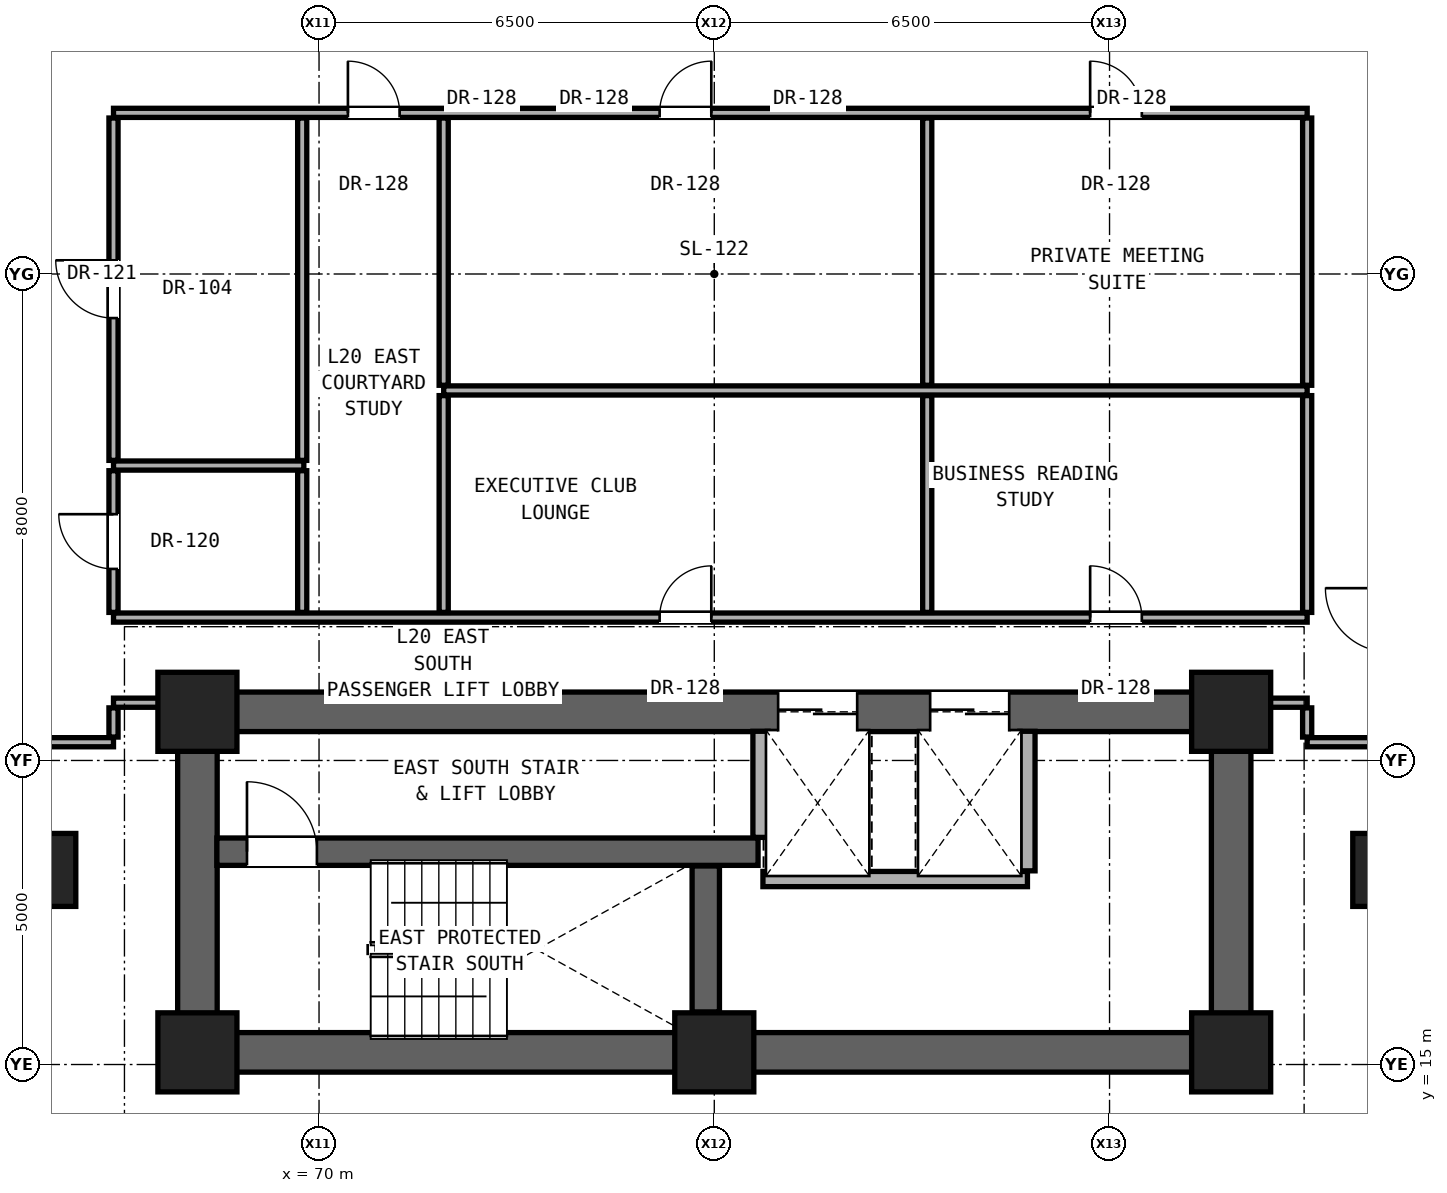
"""IFC4 building model, lengths in metres.
Left out: names, types, materials, properties, quantities, classifications, styles, units other than length and angle.
Written with IfcOpenShell. Run it as: python <this file> out.ifc"""

import sys

from ifc_helpers import new_model, si_unit, direction, frame, frame_2d, origin, origin_2d, place, context, subcontext, project, spatial, rectangle, extrude, element, fill, save


model = new_model("IFC4")
c1 = context("Model", 3, precision=1e-05, world=origin(), true_north=direction((0.0, 1.0)))
c2 = subcontext(c1, "Body", "Model", "MODEL_VIEW")
j1 = project(units=[si_unit("LENGTHUNIT", "METRE"), si_unit("PLANEANGLEUNIT", "RADIAN")], contexts=[c1])
p1 = place(None, origin())
s1 = spatial("IfcSite", under=j1, at=p1, CompositionType="ELEMENT")
p2 = place(p1, origin())
s2 = spatial("IfcBuilding", under=s1, at=p2, CompositionType="ELEMENT")
p3 = place(p2, frame((0.0, 0.0, 71.9)))
s3 = spatial("IfcBuildingStorey", under=s2, at=p3, CompositionType="ELEMENT", Elevation=71.9)
for number, where, z_axis, x_axis in (
    (1, (68.0, 15.2, 0.0), (0.0, 0.0, 1.0), (1.0, 0.0, 0.0)),
    (2, (76.5, 15.2, 0.0), (0.0, 0.0, 1.0), (1.0, 0.0, 0.0)),
    (3, (85.0, 15.2, 0.0), (0.0, 0.0, 1.0), (1.0, 0.0, 0.0)),
    (4, (68.0, 20.8, 0.0), (0.0, 0.0, 1.0), (1.0, 0.0, 0.0)),
    (5, (85.0, 20.8, 0.0), (0.0, 0.0, 1.0), (1.0, 0.0, 0.0)),
):
    element("IfcColumn", number, at=place(p3, frame(where, z_axis=z_axis, x_axis=x_axis)), inside=s3, PredefinedType="COLUMN", context=c2, shape_type="SweptSolid", body=[
        extrude(rectangle(XDim=1.3, YDim=1.3, at=origin_2d()), origin(), (0.0, 0.0, 1.0), 3.3),
    ])
for number, where, z_axis, x_axis in (
    (6, (65.6, 18.2, 0.0), (0.0, 0.0, 1.0), (1.0, 0.0, 0.0)),
    (7, (87.4, 18.2, 0.0), (0.0, 0.0, 1.0), (1.0, 0.0, 0.0)),
):
    element("IfcColumn", number, at=place(p3, frame(where, z_axis=z_axis, x_axis=x_axis)), inside=s3, PredefinedType="PILASTER", context=c2, shape_type="SweptSolid", body=[
        extrude(rectangle(XDim=0.8, YDim=1.2, at=origin_2d()), origin(), (0.0, 0.0, 1.0), 3.3),
    ])
p4 = place(p3, frame((68.0, 15.2, 0.0), z_axis=(0.0, 0.0, 1.0), x_axis=(1.0, 0.0, 0.0)))
e8 = element("IfcWall", 8, at=p4, inside=s3, PredefinedType="SHEAR", context=c2, shape_type="SweptSolid", body=[
    extrude(rectangle(XDim=17.0, YDim=0.65, at=frame_2d((8.5, 0.0))), origin(), (0.0, 0.0, 1.0), 3.06),
])
for number, where, z_axis, x_axis in (
    (9, (68.0, 15.2, 0.0), (0.0, 0.0, 1.0), (0.0, 1.0, 0.0)),
    (10, (85.0, 15.2, 0.0), (0.0, 0.0, 1.0), (0.0, 1.0, 0.0)),
):
    element("IfcWall", number, at=place(p3, frame(where, z_axis=z_axis, x_axis=x_axis)), inside=s3, PredefinedType="SHEAR", context=c2, shape_type="SweptSolid", body=[
        extrude(rectangle(XDim=5.6, YDim=0.65, at=frame_2d((2.8, 0.0))), origin(), (0.0, 0.0, 1.0), 3.06),
    ])
p5 = place(p3, frame((68.0, 20.8, 0.0), z_axis=(0.0, 0.0, 1.0), x_axis=(1.0, 0.0, 0.0)))
e11 = element("IfcWall", 11, at=p5, inside=s3, PredefinedType="SHEAR", context=c2, shape_type="SweptSolid", body=[
    extrude(rectangle(XDim=17.0, YDim=0.65, at=frame_2d((8.5, 0.0))), origin(), (0.0, 0.0, 1.0), 3.06),
])
p6 = place(p5, frame((9.55, 0.0, 0.0)))
e12 = element("IfcOpeningElement", 12, at=p6, cuts=e11, PredefinedType="OPENING", context=c2, shape_type="SweptSolid", body=[
    extrude(rectangle(XDim=1.3, YDim=2.3, at=frame_2d((0.65, 1.15))), frame((0.0, 0.335, 0.0), z_axis=(0.0, -1.0, 0.0), x_axis=(1.0, 0.0, 0.0)), (0.0, 0.0, 1.0), 0.67),
])
p7 = place(p5, frame((12.05, 0.0, 0.0)))
e13 = element("IfcOpeningElement", 13, at=p7, cuts=e11, PredefinedType="OPENING", context=c2, shape_type="SweptSolid", body=[
    extrude(rectangle(XDim=1.3, YDim=2.3, at=frame_2d((0.65, 1.15))), frame((0.0, 0.335, 0.0), z_axis=(0.0, -1.0, 0.0), x_axis=(1.0, 0.0, 0.0)), (0.0, 0.0, 1.0), 0.67),
])
p8 = place(p3, frame((77.3, 18.05, 0.0), z_axis=(0.0, 0.0, 1.0), x_axis=(1.0, 0.0, 0.0)))
e14 = element("IfcWall", 14, at=p8, inside=s3, PredefinedType="SOLIDWALL", context=c2, shape_type="SweptSolid", body=[
    extrude(rectangle(XDim=4.35, YDim=0.25, at=frame_2d((2.175, 0.0))), origin(), (0.0, 0.0, 1.0), 3.06),
])
p9 = place(p3, frame((68.32, 18.5, 0.0), z_axis=(0.0, 0.0, 1.0), x_axis=(1.0, 0.0, 0.0)))
e15 = element("IfcWall", 15, at=p9, inside=s3, PredefinedType="SHEAR", context=c2, shape_type="SweptSolid", body=[
    extrude(rectangle(XDim=8.9, YDim=0.45, at=frame_2d((4.45, 0.0))), origin(), (0.0, 0.0, 1.0), 3.06),
])
p10 = place(p9, frame((0.495, 0.0, 0.0)))
e16 = element("IfcOpeningElement", 16, at=p10, cuts=e15, PredefinedType="OPENING", context=c2, shape_type="SweptSolid", body=[
    extrude(rectangle(XDim=1.15, YDim=2.2, at=frame_2d((0.575, 1.1))), frame((0.0, 0.235, 0.0), z_axis=(0.0, -1.0, 0.0), x_axis=(1.0, 0.0, 0.0)), (0.0, 0.0, 1.0), 0.47),
])
p11 = place(p3, frame((65.25, 20.3, 0.0), z_axis=(0.0, 0.0, 1.0), x_axis=(1.0, 0.0, 0.0)))
e17 = element("IfcWall", 17, at=p11, inside=s3, PredefinedType="PARTITIONING", context=c2, shape_type="SweptSolid", body=[
    extrude(rectangle(XDim=1.37, YDim=0.15, at=frame_2d((0.685, 0.0))), origin(), (0.0, 0.0, 1.0), 3.06),
])
p12 = place(p3, frame((86.25, 20.3, 0.0), z_axis=(0.0, 0.0, 1.0), x_axis=(1.0, 0.0, 0.0)))
e18 = element("IfcWall", 18, at=p12, inside=s3, PredefinedType="PARTITIONING", context=c2, shape_type="SweptSolid", body=[
    extrude(rectangle(XDim=1.35, YDim=0.15, at=frame_2d((0.675, 0.0))), origin(), (0.0, 0.0, 1.0), 3.06),
])
p13 = place(p3, frame((66.62, 20.95, 0.0), z_axis=(0.0, 0.0, 1.0), x_axis=(1.0, 0.0, 0.0)))
e19 = element("IfcWall", 19, at=p13, inside=s3, PredefinedType="PARTITIONING", context=c2, shape_type="SweptSolid", body=[
    extrude(rectangle(XDim=1.06, YDim=0.15, at=frame_2d((0.53, 0.0))), origin(), (0.0, 0.0, 1.0), 2.452),
])
p14 = place(p3, frame((85.32, 20.95, 0.0), z_axis=(0.0, 0.0, 1.0), x_axis=(1.0, 0.0, 0.0)))
e20 = element("IfcWall", 20, at=p14, inside=s3, PredefinedType="PARTITIONING", context=c2, shape_type="SweptSolid", body=[
    extrude(rectangle(XDim=0.93, YDim=0.15, at=frame_2d((0.465, 0.0))), origin(), (0.0, 0.0, 1.0), 2.452),
])
p15 = place(p3, frame((66.62, 22.35, 0.0), z_axis=(0.0, 0.0, 1.0), x_axis=(1.0, 0.0, 0.0)))
e21 = element("IfcWall", 21, at=p15, inside=s3, PredefinedType="PARTITIONING", context=c2, shape_type="SweptSolid", body=[
    extrude(rectangle(XDim=19.63, YDim=0.15, at=frame_2d((9.815, 0.0))), origin(), (0.0, 0.0, 1.0), 2.125),
])
p16 = place(p15, frame((8.981, 0.0, 0.0)))
e22 = element("IfcOpeningElement", 22, at=p16, cuts=e21, PredefinedType="OPENING", context=c2, shape_type="SweptSolid", body=[
    extrude(rectangle(XDim=0.85, YDim=2.01, at=frame_2d((0.425, 1.005))), frame((0.0, 0.085, 0.0), z_axis=(0.0, -1.0, 0.0), x_axis=(1.0, 0.0, 0.0)), (0.0, 0.0, 1.0), 0.17),
])
p17 = place(p15, frame((16.061, 0.0, 0.0)))
e23 = element("IfcOpeningElement", 23, at=p17, cuts=e21, PredefinedType="OPENING", context=c2, shape_type="SweptSolid", body=[
    extrude(rectangle(XDim=0.85, YDim=2.01, at=frame_2d((0.425, 1.005))), frame((0.0, 0.085, 0.0), z_axis=(0.0, -1.0, 0.0), x_axis=(1.0, 0.0, 0.0)), (0.0, 0.0, 1.0), 0.17),
])
p18 = place(p3, frame((66.62, 24.85, 0.0), z_axis=(0.0, 0.0, 1.0), x_axis=(1.0, 0.0, 0.0)))
e24 = element("IfcWall", 24, at=p18, inside=s3, PredefinedType="PARTITIONING", context=c2, shape_type="SweptSolid", body=[
    extrude(rectangle(XDim=3.13, YDim=0.15, at=frame_2d((1.565, 0.0))), origin(), (0.0, 0.0, 1.0), 2.125),
])
p19 = place(p3, frame((72.05, 26.085, 0.0), z_axis=(0.0, 0.0, 1.0), x_axis=(1.0, 0.0, 0.0)))
e25 = element("IfcWall", 25, at=p19, inside=s3, PredefinedType="PARTITIONING", context=c2, shape_type="SweptSolid", body=[
    extrude(rectangle(XDim=14.2, YDim=0.15, at=frame_2d((7.1, 0.0))), origin(), (0.0, 0.0, 1.0), 2.125),
])
p20 = place(p3, frame((66.62, 30.65, 0.0), z_axis=(0.0, 0.0, 1.0), x_axis=(1.0, 0.0, 0.0)))
e26 = element("IfcWall", 26, at=p20, inside=s3, PredefinedType="PARTITIONING", context=c2, shape_type="SweptSolid", body=[
    extrude(rectangle(XDim=19.63, YDim=0.15, at=frame_2d((9.815, 0.0))), origin(), (0.0, 0.0, 1.0), 2.125),
])
p21 = place(p20, frame((3.855, 0.0, 0.0)))
e27 = element("IfcOpeningElement", 27, at=p21, cuts=e26, PredefinedType="OPENING", context=c2, shape_type="SweptSolid", body=[
    extrude(rectangle(XDim=0.85, YDim=2.01, at=frame_2d((0.425, 1.005))), frame((0.0, 0.085, 0.0), z_axis=(0.0, -1.0, 0.0), x_axis=(1.0, 0.0, 0.0)), (0.0, 0.0, 1.0), 0.17),
])
p22 = place(p20, frame((8.981, 0.0, 0.0)))
e28 = element("IfcOpeningElement", 28, at=p22, cuts=e26, PredefinedType="OPENING", context=c2, shape_type="SweptSolid", body=[
    extrude(rectangle(XDim=0.85, YDim=2.01, at=frame_2d((0.425, 1.005))), frame((0.0, 0.085, 0.0), z_axis=(0.0, -1.0, 0.0), x_axis=(1.0, 0.0, 0.0)), (0.0, 0.0, 1.0), 0.17),
])
p23 = place(p20, frame((16.061, 0.0, 0.0)))
e29 = element("IfcOpeningElement", 29, at=p23, cuts=e26, PredefinedType="OPENING", context=c2, shape_type="SweptSolid", body=[
    extrude(rectangle(XDim=0.85, YDim=2.01, at=frame_2d((0.425, 1.005))), frame((0.0, 0.085, 0.0), z_axis=(0.0, -1.0, 0.0), x_axis=(1.0, 0.0, 0.0)), (0.0, 0.0, 1.0), 0.17),
])
p24 = place(p3, frame((66.62, 20.385, 0.0), z_axis=(0.0, 0.0, 1.0), x_axis=(0.0, 1.0, 0.0)))
e30 = element("IfcWall", 30, at=p24, inside=s3, PredefinedType="PARTITIONING", context=c2, shape_type="SweptSolid", body=[
    extrude(rectangle(XDim=0.48, YDim=0.15, at=frame_2d((0.24, 0.0))), origin(), (0.0, 0.0, 1.0), 2.452),
])
p25 = place(p3, frame((66.62, 22.435, 0.0), z_axis=(0.0, 0.0, 1.0), x_axis=(0.0, 1.0, 0.0)))
e31 = element("IfcWall", 31, at=p25, inside=s3, PredefinedType="PARTITIONING", context=c2, shape_type="SweptSolid", body=[
    extrude(rectangle(XDim=2.33, YDim=0.15, at=frame_2d((1.165, 0.0))), origin(), (0.0, 0.0, 1.0), 3.06),
])
p26 = place(p25, frame((0.715, 0.0, 0.0)))
e32 = element("IfcOpeningElement", 32, at=p26, cuts=e31, PredefinedType="OPENING", context=c2, shape_type="SweptSolid", body=[
    extrude(rectangle(XDim=0.9, YDim=2.1, at=frame_2d((0.45, 1.05))), frame((0.0, 0.085, 0.0), z_axis=(0.0, -1.0, 0.0), x_axis=(1.0, 0.0, 0.0)), (0.0, 0.0, 1.0), 0.17),
])
p27 = place(p3, frame((66.62, 24.935, 0.0), z_axis=(0.0, 0.0, 1.0), x_axis=(0.0, 1.0, 0.0)))
e33 = element("IfcWall", 33, at=p27, inside=s3, PredefinedType="PARTITIONING", context=c2, shape_type="SweptSolid", body=[
    extrude(rectangle(XDim=5.63, YDim=0.15, at=frame_2d((2.815, 0.0))), origin(), (0.0, 0.0, 1.0), 2.279),
])
p28 = place(p27, frame((2.34, 0.0, 0.0)))
e34 = element("IfcOpeningElement", 34, at=p28, cuts=e33, PredefinedType="OPENING", context=c2, shape_type="SweptSolid", body=[
    extrude(rectangle(XDim=0.95, YDim=2.15, at=frame_2d((0.475, 1.075))), frame((0.0, 0.085, 0.0), z_axis=(0.0, -1.0, 0.0), x_axis=(1.0, 0.0, 0.0)), (0.0, 0.0, 1.0), 0.17),
])
p29 = place(p3, frame((69.723, 22.435, 0.0), z_axis=(0.0, 0.0, 1.0), x_axis=(0.0, 1.0, 0.0)))
e35 = element("IfcWall", 35, at=p29, inside=s3, PredefinedType="PARTITIONING", context=c2, shape_type="SweptSolid", body=[
    extrude(rectangle(XDim=2.33, YDim=0.15, at=frame_2d((1.165, 0.0))), origin(), (0.0, 0.0, 1.0), 3.06),
])
p30 = place(p3, frame((69.723, 24.935, 0.0), z_axis=(0.0, 0.0, 1.0), x_axis=(0.0, 1.0, 0.0)))
e36 = element("IfcWall", 36, at=p30, inside=s3, PredefinedType="PARTITIONING", context=c2, shape_type="SweptSolid", body=[
    extrude(rectangle(XDim=5.63, YDim=0.15, at=frame_2d((2.815, 0.0))), origin(), (0.0, 0.0, 1.0), 2.125),
])
p31 = place(p3, frame((72.05, 22.435, 0.0), z_axis=(0.0, 0.0, 1.0), x_axis=(0.0, 1.0, 0.0)))
e37 = element("IfcWall", 37, at=p31, inside=s3, PredefinedType="PARTITIONING", context=c2, shape_type="SweptSolid", body=[
    extrude(rectangle(XDim=3.565, YDim=0.15, at=frame_2d((1.782, 0.0))), origin(), (0.0, 0.0, 1.0), 2.589),
])
p32 = place(p3, frame((72.05, 26.17, 0.0), z_axis=(0.0, 0.0, 1.0), x_axis=(0.0, 1.0, 0.0)))
e38 = element("IfcWall", 38, at=p32, inside=s3, PredefinedType="PARTITIONING", context=c2, shape_type="SweptSolid", body=[
    extrude(rectangle(XDim=4.395, YDim=0.15, at=frame_2d((2.198, 0.0))), origin(), (0.0, 0.0, 1.0), 2.125),
])
p33 = place(p3, frame((76.36, 15.865, 0.0), z_axis=(0.0, 0.0, 1.0), x_axis=(0.0, 1.0, 0.0)))
e39 = element("IfcWall", 39, at=p33, inside=s3, PredefinedType="SHEAR", context=c2, shape_type="SweptSolid", body=[
    extrude(rectangle(XDim=2.4, YDim=0.45, at=frame_2d((1.2, 0.0))), origin(), (0.0, 0.0, 1.0), 3.06),
])
p34 = place(p3, frame((77.26, 18.735, 0.0), z_axis=(0.0, 0.0, 1.0), x_axis=(0.0, 1.0, 0.0)))
e40 = element("IfcWall", 40, at=p34, inside=s3, PredefinedType="SOLIDWALL", context=c2, shape_type="SweptSolid", body=[
    extrude(rectangle(XDim=1.745, YDim=0.25, at=frame_2d((0.873, 0.0))), origin(), (0.0, 0.0, 1.0), 3.06),
])
p35 = place(p3, frame((80.002, 22.435, 0.0), z_axis=(0.0, 0.0, 1.0), x_axis=(0.0, 1.0, 0.0)))
e41 = element("IfcWall", 41, at=p35, inside=s3, PredefinedType="PARTITIONING", context=c2, shape_type="SweptSolid", body=[
    extrude(rectangle(XDim=3.565, YDim=0.15, at=frame_2d((1.782, 0.0))), origin(), (0.0, 0.0, 1.0), 3.06),
])
p36 = place(p3, frame((80.002, 26.17, 0.0), z_axis=(0.0, 0.0, 1.0), x_axis=(0.0, 1.0, 0.0)))
e42 = element("IfcWall", 42, at=p36, inside=s3, PredefinedType="PARTITIONING", context=c2, shape_type="SweptSolid", body=[
    extrude(rectangle(XDim=4.395, YDim=0.15, at=frame_2d((2.198, 0.0))), origin(), (0.0, 0.0, 1.0), 2.125),
])
p37 = place(p3, frame((81.65, 18.185, 0.0), z_axis=(0.0, 0.0, 1.0), x_axis=(0.0, 1.0, 0.0)))
e43 = element("IfcWall", 43, at=p37, inside=s3, PredefinedType="SOLIDWALL", context=c2, shape_type="SweptSolid", body=[
    extrude(rectangle(XDim=2.295, YDim=0.25, at=frame_2d((1.147, 0.0))), origin(), (0.0, 0.0, 1.0), 3.06),
])
p38 = place(p3, frame((86.25, 20.385, 0.0), z_axis=(0.0, 0.0, 1.0), x_axis=(0.0, 1.0, 0.0)))
e44 = element("IfcWall", 44, at=p38, inside=s3, PredefinedType="PARTITIONING", context=c2, shape_type="SweptSolid", body=[
    extrude(rectangle(XDim=0.48, YDim=0.15, at=frame_2d((0.24, 0.0))), origin(), (0.0, 0.0, 1.0), 2.452),
])
p39 = place(p3, frame((86.25, 22.435, 0.0), z_axis=(0.0, 0.0, 1.0), x_axis=(0.0, 1.0, 0.0)))
e45 = element("IfcWall", 45, at=p39, inside=s3, PredefinedType="PARTITIONING", context=c2, shape_type="SweptSolid", body=[
    extrude(rectangle(XDim=3.565, YDim=0.15, at=frame_2d((1.782, 0.0))), origin(), (0.0, 0.0, 1.0), 3.06),
])
p40 = place(p3, frame((86.25, 26.17, 0.0), z_axis=(0.0, 0.0, 1.0), x_axis=(0.0, 1.0, 0.0)))
e46 = element("IfcWall", 46, at=p40, inside=s3, PredefinedType="PARTITIONING", context=c2, shape_type="SweptSolid", body=[
    extrude(rectangle(XDim=4.395, YDim=0.15, at=frame_2d((2.198, 0.0))), origin(), (0.0, 0.0, 1.0), 2.279),
])
p41 = place(p10, origin())
e47 = element("IfcDoor", 47, at=p41, inside=s3, OperationType="SINGLE_SWING_LEFT", PredefinedType="DOOR", context=c2, shape_type="SweptSolid", body=[
    extrude(rectangle(XDim=1.15, YDim=2.2, at=frame_2d((0.575, 1.1))), frame((0.0, 0.025, 0.0), z_axis=(0.0, -1.0, 0.0), x_axis=(1.0, 0.0, 0.0)), (0.0, 0.0, 1.0), 0.05),
])
fill(e16, e47)
p42 = place(p26, origin())
e48 = element("IfcDoor", 48, at=p42, inside=s3, OperationType="SINGLE_SWING_RIGHT", PredefinedType="DOOR", context=c2, shape_type="SweptSolid", body=[
    extrude(rectangle(XDim=0.9, YDim=2.1, at=frame_2d((0.45, 1.05))), frame((0.0, 0.025, 0.0), z_axis=(0.0, -1.0, 0.0), x_axis=(1.0, 0.0, 0.0)), (0.0, 0.0, 1.0), 0.05),
])
fill(e32, e48)
p43 = place(p28, origin())
e49 = element("IfcDoor", 49, at=p43, inside=s3, OperationType="SINGLE_SWING_RIGHT", PredefinedType="DOOR", context=c2, shape_type="SweptSolid", body=[
    extrude(rectangle(XDim=0.95, YDim=2.15, at=frame_2d((0.475, 1.075))), frame((0.0, 0.025, 0.0), z_axis=(0.0, -1.0, 0.0), x_axis=(1.0, 0.0, 0.0)), (0.0, 0.0, 1.0), 0.05),
])
fill(e34, e49)
p44 = place(p21, origin())
e50 = element("IfcDoor", 50, at=p44, inside=s3, OperationType="SINGLE_SWING_LEFT", PredefinedType="DOOR", context=c2, shape_type="SweptSolid", body=[
    extrude(rectangle(XDim=0.85, YDim=2.01, at=frame_2d((0.425, 1.005))), frame((0.0, 0.025, 0.0), z_axis=(0.0, -1.0, 0.0), x_axis=(1.0, 0.0, 0.0)), (0.0, 0.0, 1.0), 0.05),
])
fill(e27, e50)
p45 = place(p16, origin())
e51 = element("IfcDoor", 51, at=p45, inside=s3, OperationType="SINGLE_SWING_RIGHT", PredefinedType="DOOR", context=c2, shape_type="SweptSolid", body=[
    extrude(rectangle(XDim=0.85, YDim=2.01, at=frame_2d((0.425, 1.005))), frame((0.0, 0.025, 0.0), z_axis=(0.0, -1.0, 0.0), x_axis=(1.0, 0.0, 0.0)), (0.0, 0.0, 1.0), 0.05),
])
fill(e22, e51)
p46 = place(p17, origin())
e52 = element("IfcDoor", 52, at=p46, inside=s3, OperationType="SINGLE_SWING_LEFT", PredefinedType="DOOR", context=c2, shape_type="SweptSolid", body=[
    extrude(rectangle(XDim=0.85, YDim=2.01, at=frame_2d((0.425, 1.005))), frame((0.0, 0.025, 0.0), z_axis=(0.0, -1.0, 0.0), x_axis=(1.0, 0.0, 0.0)), (0.0, 0.0, 1.0), 0.05),
])
fill(e23, e52)
p47 = place(p22, origin())
e53 = element("IfcDoor", 53, at=p47, inside=s3, OperationType="SINGLE_SWING_RIGHT", PredefinedType="DOOR", context=c2, shape_type="SweptSolid", body=[
    extrude(rectangle(XDim=0.85, YDim=2.01, at=frame_2d((0.425, 1.005))), frame((0.0, 0.025, 0.0), z_axis=(0.0, -1.0, 0.0), x_axis=(1.0, 0.0, 0.0)), (0.0, 0.0, 1.0), 0.05),
])
fill(e28, e53)
p48 = place(p23, origin())
e54 = element("IfcDoor", 54, at=p48, inside=s3, OperationType="SINGLE_SWING_LEFT", PredefinedType="DOOR", context=c2, shape_type="SweptSolid", body=[
    extrude(rectangle(XDim=0.85, YDim=2.01, at=frame_2d((0.425, 1.005))), frame((0.0, 0.025, 0.0), z_axis=(0.0, -1.0, 0.0), x_axis=(1.0, 0.0, 0.0)), (0.0, 0.0, 1.0), 0.05),
])
fill(e29, e54)
p49 = place(p6, origin())
e55 = element("IfcDoor", 55, at=p49, inside=s3, OperationType="DOUBLE_DOOR_SLIDING", PredefinedType="DOOR", context=c2, shape_type="SweptSolid", body=[
    extrude(rectangle(XDim=1.3, YDim=2.3, at=frame_2d((0.65, 1.15))), frame((0.0, 0.025, 0.0), z_axis=(0.0, -1.0, 0.0), x_axis=(1.0, 0.0, 0.0)), (0.0, 0.0, 1.0), 0.05),
])
fill(e12, e55)
p50 = place(p7, origin())
e56 = element("IfcDoor", 56, at=p50, inside=s3, OperationType="DOUBLE_DOOR_SLIDING", PredefinedType="DOOR", context=c2, shape_type="SweptSolid", body=[
    extrude(rectangle(XDim=1.3, YDim=2.3, at=frame_2d((0.65, 1.15))), frame((0.0, 0.025, 0.0), z_axis=(0.0, -1.0, 0.0), x_axis=(1.0, 0.0, 0.0)), (0.0, 0.0, 1.0), 0.05),
])
fill(e13, e56)
save(model, sys.argv[1])
